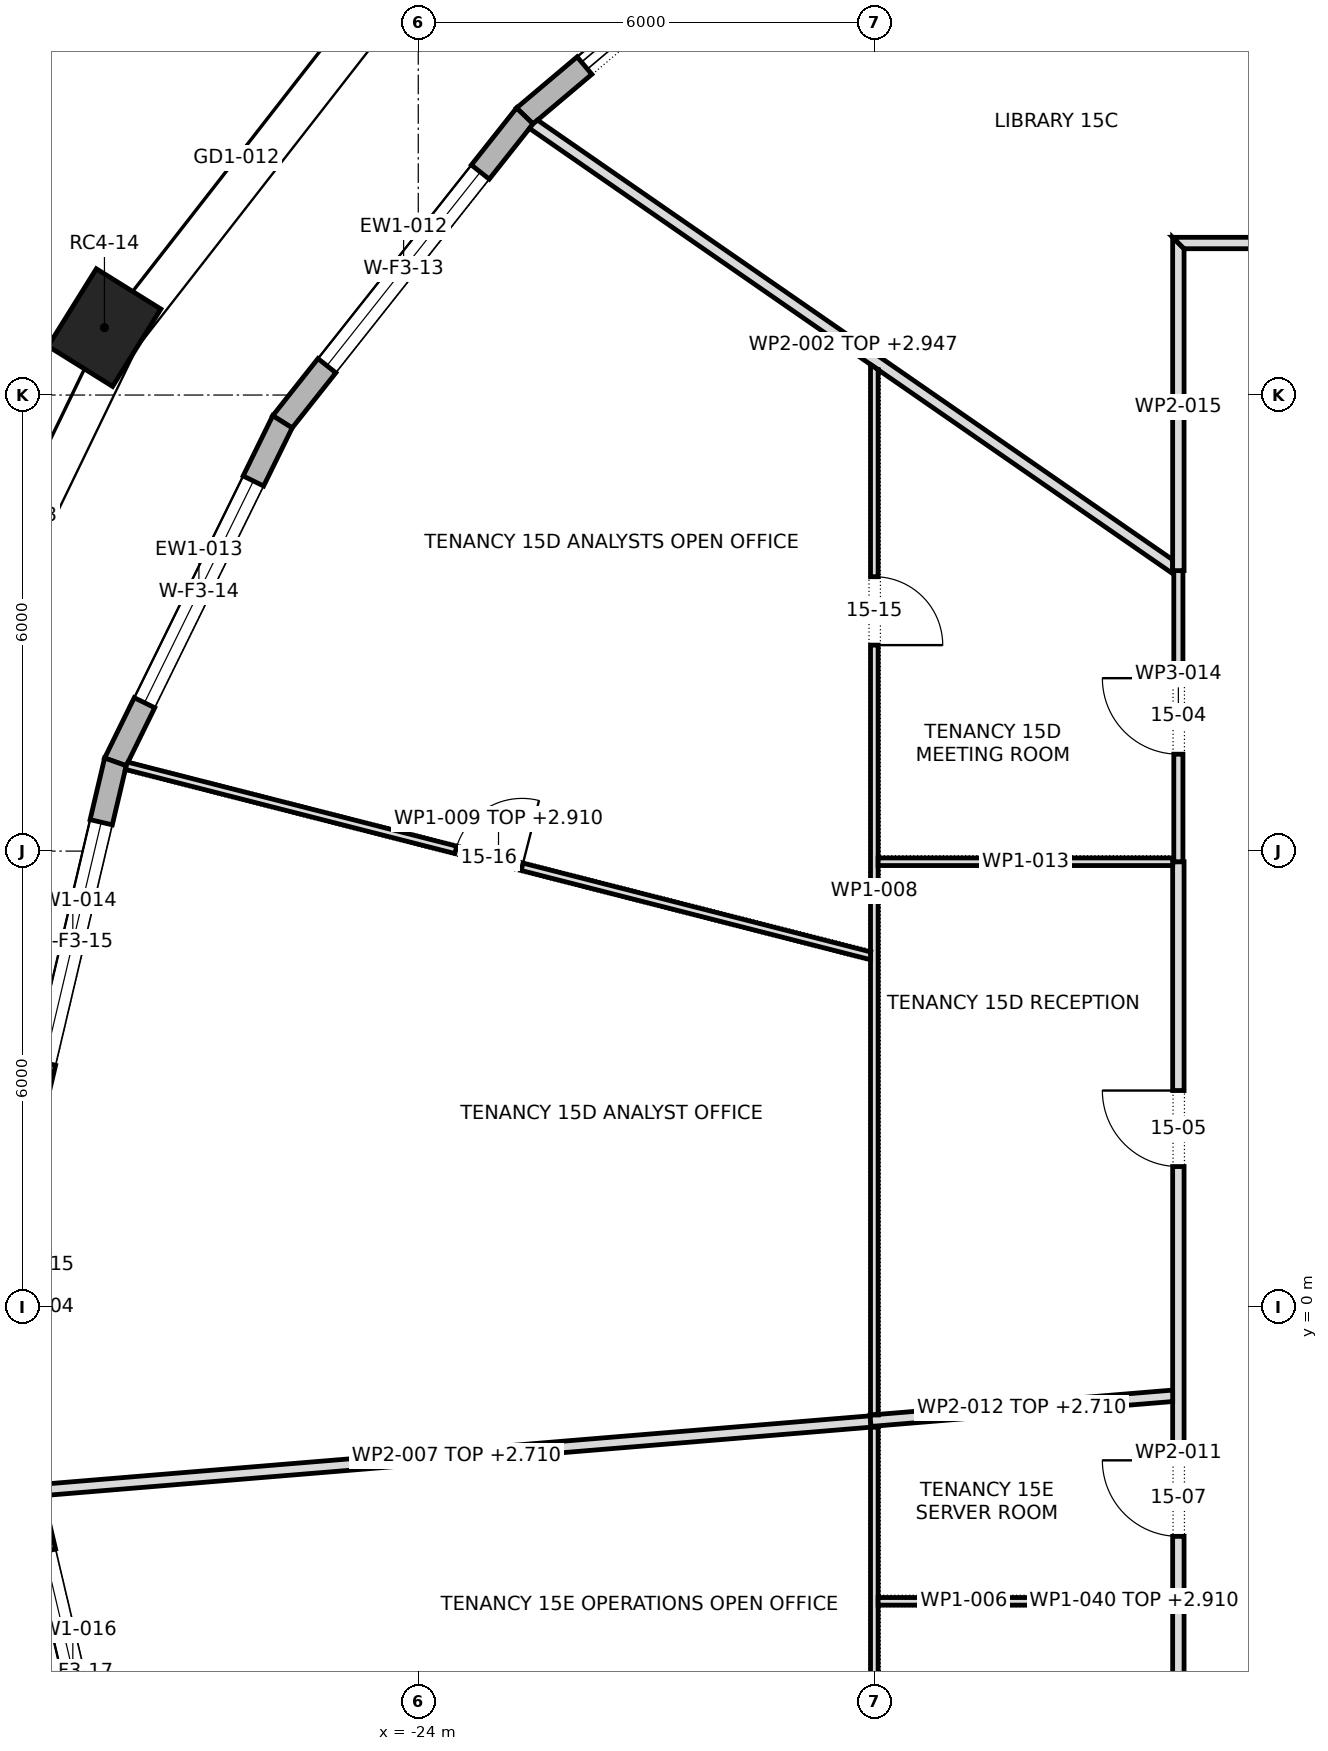
"""IFC4 building model, lengths in metres.
Left out: names, types, materials, properties, quantities, classifications, styles, units other than length and angle.
Written with IfcOpenShell. Run it as: python <this file> out.ifc"""

import sys

from ifc_helpers import new_model, si_unit, direction, frame, frame_2d, origin, origin_2d, place, context, subcontext, project, spatial, polyline, rectangle, outline, extrude, element, fill, save


model = new_model("IFC4")
c1 = context("Model", 3, precision=1e-05, world=origin(), true_north=direction((0.0, 1.0)))
c2 = subcontext(c1, "Body", "Model", "MODEL_VIEW")
j1 = project(units=[si_unit("LENGTHUNIT", "METRE"), si_unit("PLANEANGLEUNIT", "RADIAN")], contexts=[c1])
p1 = place(None, origin())
s1 = spatial("IfcSite", under=j1, at=p1, CompositionType="ELEMENT")
p2 = place(p1, origin())
s2 = spatial("IfcBuilding", under=s1, at=p2, CompositionType="ELEMENT")
p3 = place(p2, frame((0.0, 0.0, 214.9)))
s3 = spatial("IfcBuildingStorey", under=s2, at=p3, CompositionType="ELEMENT", Elevation=214.9)
p4 = place(p3, frame((-28.129, 12.887, 0.0), z_axis=(0.0, 0.0, 1.0), x_axis=(-0.529144939165, -0.848531456904, 0.0)))
e1 = element("IfcColumn", 1, at=p4, inside=s3, PredefinedType="COLUMN", context=c2, shape_type="SweptSolid", body=[
    extrude(rectangle(XDim=1.2, YDim=1.0, at=origin_2d()), origin(), (0.0, 0.0, 1.0), 4.0),
])
p5 = place(p3, frame((-18.543, 19.092, 0.0), z_axis=(0.0, 0.0, 1.0), x_axis=(-0.764397795062, -0.644744919255, 0.0)))
e2 = element("IfcWall", 2, at=p5, inside=s3, PredefinedType="STANDARD", context=c2, shape_type="SweptSolid", body=[
    extrude(outline(polyline([(-0.014, -0.15), (5.32, -0.15), (5.29, 0.15), (0.014, 0.15), (-0.014, -0.15)])), origin(), (0.0, 0.0, 1.0), 3.7),
])
p6 = place(p5, frame((1.028, 0.0, 0.0)))
e3 = element("IfcOpeningElement", 3, at=p6, cuts=e2, PredefinedType="OPENING", context=c2, shape_type="SweptSolid", body=[
    extrude(rectangle(XDim=3.25, YDim=3.25, at=frame_2d((1.625, 1.625))), frame((0.0, 0.162, 0.0), z_axis=(0.0, -1.0, 0.0), x_axis=(1.0, 0.0, 0.0)), (0.0, 0.0, 1.0), 0.324),
])
p7 = place(p3, frame((-22.599, 15.672, 0.0), z_axis=(0.0, 0.0, 1.0), x_axis=(-0.621017151557, -0.783796974651, 0.0)))
e4 = element("IfcWall", 4, at=p7, inside=s3, PredefinedType="STANDARD", context=c2, shape_type="SweptSolid", body=[
    extrude(outline(polyline([(-0.015, -0.15), (5.15, -0.15), (5.118, 0.15), (0.015, 0.15), (-0.015, -0.15)])), origin(), (0.0, 0.0, 1.0), 3.7),
])
p8 = place(p7, frame((0.942, 0.0, 0.6)))
e5 = element("IfcOpeningElement", 5, at=p8, cuts=e4, PredefinedType="OPENING", context=c2, shape_type="SweptSolid", body=[
    extrude(rectangle(XDim=3.25, YDim=2.65, at=frame_2d((1.625, 1.325))), frame((0.0, 0.162, 0.0), z_axis=(0.0, -1.0, 0.0), x_axis=(1.0, 0.0, 0.0)), (0.0, 0.0, 1.0), 0.324),
])
p9 = place(p3, frame((-25.787, 11.648, 0.0), z_axis=(0.0, 0.0, 1.0), x_axis=(-0.440795186599, -0.897607711348, 0.0)))
e6 = element("IfcWall", 6, at=p9, inside=s3, PredefinedType="STANDARD", context=c2, shape_type="SweptSolid", body=[
    extrude(outline(polyline([(-0.016, -0.15), (5.001, -0.15), (4.967, 0.15), (0.016, 0.15), (-0.016, -0.15)])), origin(), (0.0, 0.0, 1.0), 3.7),
])
p10 = place(p9, frame((0.867, 0.0, 0.6)))
e7 = element("IfcOpeningElement", 7, at=p10, cuts=e6, PredefinedType="OPENING", context=c2, shape_type="SweptSolid", body=[
    extrude(rectangle(XDim=3.25, YDim=2.65, at=frame_2d((1.625, 1.325))), frame((0.0, 0.162, 0.0), z_axis=(0.0, -1.0, 0.0), x_axis=(1.0, 0.0, 0.0)), (0.0, 0.0, 1.0), 0.324),
])
p11 = place(p3, frame((-27.984, 7.174, 0.0), z_axis=(0.0, 0.0, 1.0), x_axis=(-0.229546618766, -0.97329766763, 0.0)))
e8 = element("IfcWall", 8, at=p11, inside=s3, PredefinedType="STANDARD", context=c2, shape_type="SweptSolid", body=[
    extrude(outline(polyline([(-0.017, -0.15), (4.899, -0.15), (4.865, 0.15), (0.017, 0.15), (-0.017, -0.15)])), origin(), (0.0, 0.0, 1.0), 3.7),
])
p12 = place(p11, frame((0.816, 0.0, 0.6)))
e9 = element("IfcOpeningElement", 9, at=p12, cuts=e8, PredefinedType="OPENING", context=c2, shape_type="SweptSolid", body=[
    extrude(rectangle(XDim=3.25, YDim=2.65, at=frame_2d((1.625, 1.325))), frame((0.0, 0.162, 0.0), z_axis=(0.0, -1.0, 0.0), x_axis=(1.0, 0.0, 0.0)), (0.0, 0.0, 1.0), 0.324),
])
p13 = place(p3, frame((-29.104, -2.423, 0.0), z_axis=(0.0, 0.0, 1.0), x_axis=(0.229546618766, -0.97329766763, 0.0)))
e10 = element("IfcWall", 10, at=p13, inside=s3, PredefinedType="STANDARD", context=c2, shape_type="SweptSolid", body=[
    extrude(outline(polyline([(-0.017, -0.15), (4.899, -0.15), (4.865, 0.15), (0.017, 0.15), (-0.017, -0.15)])), origin(), (0.0, 0.0, 1.0), 3.7),
])
p14 = place(p13, frame((0.816, 0.0, 0.6)))
e11 = element("IfcOpeningElement", 11, at=p14, cuts=e10, PredefinedType="OPENING", context=c2, shape_type="SweptSolid", body=[
    extrude(rectangle(XDim=3.25, YDim=2.65, at=frame_2d((1.625, 1.325))), frame((0.0, 0.162, 0.0), z_axis=(0.0, -1.0, 0.0), x_axis=(1.0, 0.0, 0.0)), (0.0, 0.0, 1.0), 0.324),
])
p15 = place(p3, frame((-22.494, 15.57, 0.0), z_axis=(0.0, 0.0, 1.0), x_axis=(0.822227997751, -0.569158255421, 0.0)))
e12 = element("IfcWall", 12, at=p15, inside=s3, PredefinedType="PARTITIONING", context=c2, shape_type="SweptSolid", body=[
    extrude(outline(polyline([(0.0, -0.075), (1.858, -0.075), (3.717, -0.075), (5.575, -0.075), (5.577, -0.073), (5.578, -0.075), (7.155, -0.075), (8.732, -0.075), (10.309, -0.075), (10.309, -0.075), (10.281, -0.034), (10.269, -0.043), (10.24, -0.002), (10.24, -0.002), (10.187, 0.075), (8.493, 0.075), (6.8, 0.075), (5.106, 0.075), (3.412, 0.075), (1.719, 0.075), (0.025, 0.075), (0.004, -0.0), (0.0, -0.066), (0.0, -0.075)])), origin(), (0.0, 0.0, 1.0), 2.947),
])
p16 = place(p3, frame((-18.0, -12.421, 0.0), z_axis=(0.0, 0.0, 1.0), x_axis=(0.0, 1.0, 0.0)))
e13 = element("IfcWall", 13, at=p16, inside=s3, PredefinedType="PARTITIONING", context=c2, shape_type="SweptSolid", body=[
    extrude(outline(polyline([(0.087, -0.05), (1.77, -0.05), (3.453, -0.05), (5.136, -0.05), (6.819, -0.05), (8.501, -0.05), (8.501, -0.05), (8.601, -0.05), (8.601, -0.05), (10.842, -0.05), (10.842, 0.046), (10.842, 0.05), (9.191, 0.05), (7.541, 0.05), (5.89, 0.05), (4.24, 0.05), (4.235, 0.048), (4.234, 0.05), (2.823, 0.05), (1.411, 0.05), (0.0, 0.05), (0.0, 0.05), (0.011, 0.034), (0.023, 0.043), (0.087, -0.05)])), origin(), (0.0, 0.0, 1.0), 3.7),
])
p17 = place(p16, frame((5.981, 0.0, 0.0)))
e14 = element("IfcOpeningElement", 14, at=p17, cuts=e13, PredefinedType="OPENING", context=c2, shape_type="SweptSolid", body=[
    extrude(rectangle(XDim=0.9, YDim=2.1, at=frame_2d((0.45, 1.05))), frame((0.0, 0.062, 0.0), z_axis=(0.0, -1.0, 0.0), x_axis=(1.0, 0.0, 0.0)), (0.0, 0.0, 1.0), 0.124),
])
p18 = place(p3, frame((-17.95, -3.87, 0.0), z_axis=(0.0, 0.0, 1.0), x_axis=(1.0, 0.0, 0.0)))
e15 = element("IfcWall", 15, at=p18, inside=s3, PredefinedType="PARTITIONING", context=c2, shape_type="SweptSolid", body=[
    extrude(rectangle(XDim=2.258, YDim=0.1, at=frame_2d((1.129, 0.0))), origin(), (0.0, 0.0, 1.0), 3.7),
])
p19 = place(p3, frame((-18.049, -1.504, 0.0), z_axis=(0.0, 0.0, 1.0), x_axis=(-0.996601116086, -0.082378488796, 0.0)))
e16 = element("IfcWall", 16, at=p19, inside=s3, PredefinedType="PARTITIONING", context=c2, shape_type="SweptSolid", body=[
    extrude(outline(polyline([(10.936, -0.075), (10.936, 0.044), (10.931, 0.075), (9.11, 0.075), (7.29, 0.075), (5.469, 0.075), (3.648, 0.075), (1.828, 0.075), (0.007, 0.075), (0.007, 0.074), (0.002, 0.075), (0.0, 0.075), (0.0, -0.075), (1.823, -0.075), (3.645, -0.075), (5.468, -0.075), (7.291, -0.075), (9.113, -0.075), (10.936, -0.075)])), origin(), (0.0, 0.0, 1.0), 2.71),
])
p20 = place(p3, frame((-18.0, -1.418, 0.0), z_axis=(0.0, 0.0, 1.0), x_axis=(0.0, 1.0, 0.0)))
e17 = element("IfcWall", 17, at=p20, inside=s3, PredefinedType="PARTITIONING", context=c2, shape_type="SweptSolid", body=[
    extrude(outline(polyline([(0.008, -0.05), (1.813, -0.05), (3.618, -0.05), (5.423, -0.05), (7.229, -0.05), (7.229, -0.05), (7.328, -0.05), (7.328, -0.05), (8.934, -0.05), (10.54, -0.05), (12.146, -0.05), (13.751, -0.05), (13.821, 0.05), (13.821, 0.05), (11.889, 0.05), (9.957, 0.05), (8.025, 0.05), (6.093, 0.05), (6.092, 0.048), (6.085, 0.05), (4.564, 0.05), (3.042, 0.05), (1.521, 0.05), (0.0, 0.05), (0.0, 0.045), (0.008, -0.05)])), origin(), (0.0, 0.0, 1.0), 3.7),
])
p21 = place(p20, frame((10.128, 0.0, 0.0)))
e18 = element("IfcOpeningElement", 18, at=p21, cuts=e17, PredefinedType="OPENING", context=c2, shape_type="SweptSolid", body=[
    extrude(rectangle(XDim=0.9, YDim=2.1, at=frame_2d((0.45, 1.05))), frame((0.0, 0.062, 0.0), z_axis=(0.0, -1.0, 0.0), x_axis=(1.0, 0.0, 0.0)), (0.0, 0.0, 1.0), 0.124),
])
p22 = place(p3, frame((-18.038, 4.62, 0.0), z_axis=(0.0, 0.0, 1.0), x_axis=(-0.96889210833, 0.247483499279, 0.0)))
e19 = element("IfcWall", 19, at=p22, inside=s3, PredefinedType="PARTITIONING", context=c2, shape_type="SweptSolid", body=[
    extrude(outline(polyline([(0.025, -0.05), (1.706, -0.05), (3.386, -0.05), (5.067, -0.05), (6.747, -0.05), (8.427, -0.05), (10.108, -0.05), (10.117, -0.005), (10.117, 0.05), (8.431, 0.05), (6.745, 0.05), (5.059, 0.05), (3.373, 0.05), (1.686, 0.05), (0.0, 0.05), (0.0, 0.049), (0.025, -0.05)])), origin(), (0.0, 0.0, 1.0), 2.91),
])
p23 = place(p22, frame((4.744, 0.0, 0.0)))
e20 = element("IfcOpeningElement", 20, at=p23, cuts=e19, PredefinedType="OPENING", context=c2, shape_type="SweptSolid", body=[
    extrude(rectangle(XDim=0.9, YDim=2.1, at=frame_2d((0.45, 1.05))), frame((0.0, 0.062, 0.0), z_axis=(0.0, -1.0, 0.0), x_axis=(1.0, 0.0, 0.0)), (0.0, 0.0, 1.0), 0.124),
])
p24 = place(p3, frame((-14.0, -9.729, 0.0), z_axis=(0.0, 0.0, 1.0), x_axis=(0.0, 1.0, 0.0)))
e21 = element("IfcWall", 21, at=p24, inside=s3, PredefinedType="PARTITIONING", context=c2, shape_type="SweptSolid", body=[
    extrude(outline(polyline([(15.589, 0.075), (13.65, 0.075), (11.712, 0.075), (9.773, 0.075), (7.834, 0.075), (5.895, 0.075), (3.956, 0.075), (2.017, 0.075), (0.079, 0.075), (0.0, -0.075), (0.0, -0.075), (1.949, -0.075), (3.897, -0.075), (5.846, -0.075), (7.795, -0.075), (9.743, -0.075), (11.692, -0.075), (13.641, -0.075), (15.589, -0.075), (15.589, 0.075)])), origin(), (0.0, 0.0, 1.0), 3.7),
])
p25 = place(p24, frame((11.579, 0.0, 0.0)))
e22 = element("IfcOpeningElement", 22, at=p25, cuts=e21, PredefinedType="OPENING", context=c2, shape_type="SweptSolid", body=[
    extrude(rectangle(XDim=1.0, YDim=2.1, at=frame_2d((0.5, 1.05))), frame((0.0, 0.087, 0.0), z_axis=(0.0, -1.0, 0.0), x_axis=(1.0, 0.0, 0.0)), (0.0, 0.0, 1.0), 0.174),
])
p26 = place(p24, frame((2.449, 0.0, 0.0)))
e23 = element("IfcOpeningElement", 23, at=p26, cuts=e21, PredefinedType="OPENING", context=c2, shape_type="SweptSolid", body=[
    extrude(rectangle(XDim=1.0, YDim=2.1, at=frame_2d((0.5, 1.05))), frame((0.0, 0.087, 0.0), z_axis=(0.0, -1.0, 0.0), x_axis=(1.0, 0.0, 0.0)), (0.0, 0.0, 1.0), 0.174),
])
p27 = place(p24, frame((6.714, 0.0, 0.0)))
e24 = element("IfcOpeningElement", 24, at=p27, cuts=e21, PredefinedType="OPENING", context=c2, shape_type="SweptSolid", body=[
    extrude(rectangle(XDim=1.0, YDim=2.1, at=frame_2d((0.5, 1.05))), frame((0.0, 0.087, 0.0), z_axis=(0.0, -1.0, 0.0), x_axis=(1.0, 0.0, 0.0)), (0.0, 0.0, 1.0), 0.174),
])
p28 = place(p3, frame((-14.069, -1.166, 0.0), z_axis=(0.0, 0.0, 1.0), x_axis=(-0.996614549641, -0.082215810186, 0.0)))
e25 = element("IfcWall", 25, at=p28, inside=s3, PredefinedType="PARTITIONING", context=c2, shape_type="SweptSolid", body=[
    extrude(outline(polyline([(0.0, -0.075), (1.944, -0.075), (3.888, -0.075), (3.888, -0.067), (3.982, -0.075), (3.994, -0.075), (3.994, 0.075), (2.003, 0.075), (0.012, 0.075), (0.0, -0.069), (0.0, -0.075)])), origin(), (0.0, 0.0, 1.0), 2.71),
])
p29 = place(p3, frame((-14.061, 5.86, 0.0), z_axis=(0.0, 0.0, 1.0), x_axis=(-1.0, 0.0, 0.0)))
e26 = element("IfcWall", 26, at=p29, inside=s3, PredefinedType="PARTITIONING", context=c2, shape_type="SweptSolid", body=[
    extrude(outline(polyline([(3.889, 0.05), (1.952, 0.05), (0.014, 0.05), (0.014, 0.0), (0.0, 0.0), (0.0, -0.05), (1.945, -0.05), (3.889, -0.05), (3.889, 0.05)])), origin(), (0.0, 0.0, 1.0), 3.7),
])
p30 = place(p3, frame((-14.0, 5.86, 0.0), z_axis=(0.0, 0.0, 1.0), x_axis=(0.0, 1.0, 0.0)))
e27 = element("IfcWall", 27, at=p30, inside=s3, PredefinedType="PARTITIONING", context=c2, shape_type="SweptSolid", body=[
    extrude(rectangle(XDim=3.83, YDim=0.12, at=frame_2d((1.915, 0.0))), origin(), (0.0, 0.0, 1.0), 3.7),
])
p31 = place(p30, frame((1.415, 0.0, 0.0)))
e28 = element("IfcOpeningElement", 28, at=p31, cuts=e27, PredefinedType="OPENING", context=c2, shape_type="SweptSolid", body=[
    extrude(rectangle(XDim=1.0, YDim=2.1, at=frame_2d((0.5, 1.05))), frame((0.0, 0.072, 0.0), z_axis=(0.0, -1.0, 0.0), x_axis=(1.0, 0.0, 0.0)), (0.0, 0.0, 1.0), 0.144),
])
p32 = place(p3, frame((-14.0, 9.69, 0.0), z_axis=(0.0, 0.0, 1.0), x_axis=(0.0, 1.0, 0.0)))
e29 = element("IfcWall", 29, at=p32, inside=s3, PredefinedType="PARTITIONING", context=c2, shape_type="SweptSolid", body=[
    extrude(outline(polyline([(0.0, -0.075), (1.412, -0.075), (2.823, -0.075), (4.235, -0.075), (4.385, 0.075), (2.923, 0.075), (1.462, 0.075), (0.0, 0.075), (0.0, -0.075)])), origin(), (0.0, 0.0, 1.0), 3.7),
])
p33 = place(p3, frame((-14.075, 14.0, 0.0), z_axis=(0.0, 0.0, 1.0), x_axis=(1.0, 0.0, 0.0)))
e30 = element("IfcWall", 30, at=p33, inside=s3, PredefinedType="PARTITIONING", context=c2, shape_type="SweptSolid", body=[
    extrude(outline(polyline([(15.705, 0.075), (13.742, 0.075), (11.779, 0.075), (9.815, 0.075), (7.853, 0.075), (5.889, 0.075), (3.926, 0.075), (1.963, 0.075), (0.0, 0.075), (0.15, -0.075), (2.094, -0.075), (4.039, -0.075), (5.983, -0.075), (7.927, -0.075), (9.872, -0.075), (11.816, -0.075), (13.76, -0.075), (15.705, -0.075), (15.705, 0.075)])), origin(), (0.0, 0.0, 1.0), 3.7),
])
p34 = place(p33, frame((9.955, 0.0, 0.0)))
e31 = element("IfcOpeningElement", 31, at=p34, cuts=e30, PredefinedType="OPENING", context=c2, shape_type="SweptSolid", body=[
    extrude(rectangle(XDim=1.0, YDim=2.1, at=frame_2d((0.5, 1.05))), frame((0.0, 0.087, 0.0), z_axis=(0.0, -1.0, 0.0), x_axis=(1.0, 0.0, 0.0)), (0.0, 0.0, 1.0), 0.174),
])
p35 = place(p33, frame((2.14, 0.0, 0.0)))
e32 = element("IfcOpeningElement", 32, at=p35, cuts=e30, PredefinedType="OPENING", context=c2, shape_type="SweptSolid", body=[
    extrude(rectangle(XDim=1.0, YDim=2.1, at=frame_2d((0.5, 1.05))), frame((0.0, 0.087, 0.0), z_axis=(0.0, -1.0, 0.0), x_axis=(1.0, 0.0, 0.0)), (0.0, 0.0, 1.0), 0.174),
])
p36 = place(p3, frame((-8.892, 14.035, 0.0), z_axis=(0.0, 0.0, 1.0), x_axis=(-0.535558051622, 0.84449841524, 0.0)))
e33 = element("IfcWall", 33, at=p36, inside=s3, PredefinedType="PARTITIONING", context=c2, shape_type="SweptSolid", body=[
    extrude(outline(polyline([(0.0, -0.075), (1.798, -0.075), (3.595, -0.075), (5.393, -0.075), (7.191, -0.075), (8.989, -0.075), (9.006, -0.0), (9.01, 0.069), (9.01, 0.075), (7.227, 0.075), (5.444, 0.075), (3.661, 0.075), (1.878, 0.075), (0.095, 0.075), (0.0, -0.075), (0.0, -0.075)])), origin(), (0.0, 0.0, 1.0), 3.1),
])
p37 = place(p3, frame((-15.692, -3.87, 0.0), z_axis=(0.0, 0.0, 1.0), x_axis=(1.0, 0.0, 0.0)))
e34 = element("IfcWall", 34, at=p37, inside=s3, PredefinedType="PARTITIONING", context=c2, shape_type="SweptSolid", body=[
    extrude(rectangle(XDim=1.617, YDim=0.1, at=frame_2d((0.809, 0.0))), origin(), (0.0, 0.0, 1.0), 2.91),
])
p38 = place(p6, origin())
e35 = element("IfcDoor", 35, at=p38, inside=s3, OperationType="DOUBLE_DOOR_SLIDING", PredefinedType="DOOR", context=c2, shape_type="SweptSolid", body=[
    extrude(rectangle(XDim=3.25, YDim=3.25, at=frame_2d((1.625, 1.625))), frame((0.0, 0.025, 0.0), z_axis=(0.0, -1.0, 0.0), x_axis=(1.0, 0.0, 0.0)), (0.0, 0.0, 1.0), 0.05),
])
fill(e3, e35)
p39 = place(p8, origin())
e36 = element("IfcWindow", 36, at=p39, inside=s3, PartitioningType="TRIPLE_PANEL_VERTICAL", PredefinedType="WINDOW", context=c2, shape_type="SweptSolid", body=[
    extrude(rectangle(XDim=3.25, YDim=2.65, at=frame_2d((1.625, 1.325))), frame((0.0, 0.03, 0.0), z_axis=(0.0, -1.0, 0.0), x_axis=(1.0, 0.0, 0.0)), (0.0, 0.0, 1.0), 0.06),
])
fill(e5, e36)
p40 = place(p10, origin())
e37 = element("IfcWindow", 37, at=p40, inside=s3, PartitioningType="TRIPLE_PANEL_VERTICAL", PredefinedType="WINDOW", context=c2, shape_type="SweptSolid", body=[
    extrude(rectangle(XDim=3.25, YDim=2.65, at=frame_2d((1.625, 1.325))), frame((0.0, 0.03, 0.0), z_axis=(0.0, -1.0, 0.0), x_axis=(1.0, 0.0, 0.0)), (0.0, 0.0, 1.0), 0.06),
])
fill(e7, e37)
p41 = place(p12, origin())
e38 = element("IfcWindow", 38, at=p41, inside=s3, PartitioningType="TRIPLE_PANEL_VERTICAL", PredefinedType="WINDOW", context=c2, shape_type="SweptSolid", body=[
    extrude(rectangle(XDim=3.25, YDim=2.65, at=frame_2d((1.625, 1.325))), frame((0.0, 0.03, 0.0), z_axis=(0.0, -1.0, 0.0), x_axis=(1.0, 0.0, 0.0)), (0.0, 0.0, 1.0), 0.06),
])
fill(e9, e38)
p42 = place(p14, origin())
e39 = element("IfcWindow", 39, at=p42, inside=s3, PartitioningType="TRIPLE_PANEL_VERTICAL", PredefinedType="WINDOW", context=c2, shape_type="SweptSolid", body=[
    extrude(rectangle(XDim=3.25, YDim=2.65, at=frame_2d((1.625, 1.325))), frame((0.0, 0.03, 0.0), z_axis=(0.0, -1.0, 0.0), x_axis=(1.0, 0.0, 0.0)), (0.0, 0.0, 1.0), 0.06),
])
fill(e11, e39)
p43 = place(p31, origin())
e40 = element("IfcDoor", 40, at=p43, inside=s3, OperationType="SINGLE_SWING_LEFT", PredefinedType="DOOR", context=c2, shape_type="SweptSolid", body=[
    extrude(rectangle(XDim=1.0, YDim=2.1, at=frame_2d((0.5, 1.05))), frame((0.0, 0.025, 0.0), z_axis=(0.0, -1.0, 0.0), x_axis=(1.0, 0.0, 0.0)), (0.0, 0.0, 1.0), 0.05),
])
fill(e28, e40)
p44 = place(p25, origin())
e41 = element("IfcDoor", 41, at=p44, inside=s3, OperationType="SINGLE_SWING_LEFT", PredefinedType="DOOR", context=c2, shape_type="SweptSolid", body=[
    extrude(rectangle(XDim=1.0, YDim=2.1, at=frame_2d((0.5, 1.05))), frame((0.0, 0.025, 0.0), z_axis=(0.0, -1.0, 0.0), x_axis=(1.0, 0.0, 0.0)), (0.0, 0.0, 1.0), 0.05),
])
fill(e22, e41)
p45 = place(p27, origin())
e42 = element("IfcDoor", 42, at=p45, inside=s3, OperationType="SINGLE_SWING_LEFT", PredefinedType="DOOR", context=c2, shape_type="SweptSolid", body=[
    extrude(rectangle(XDim=1.0, YDim=2.1, at=frame_2d((0.5, 1.05))), frame((0.0, 0.025, 0.0), z_axis=(0.0, -1.0, 0.0), x_axis=(1.0, 0.0, 0.0)), (0.0, 0.0, 1.0), 0.05),
])
fill(e24, e42)
p46 = place(p21, frame((0.9, 0.0, 0.0), z_axis=(0.0, 0.0, 1.0), x_axis=(-1.0, 0.0, 0.0)))
e43 = element("IfcDoor", 43, at=p46, inside=s3, OperationType="SINGLE_SWING_LEFT", PredefinedType="DOOR", context=c2, shape_type="SweptSolid", body=[
    extrude(rectangle(XDim=0.9, YDim=2.1, at=frame_2d((0.45, 1.05))), frame((0.0, 0.025, 0.0), z_axis=(0.0, -1.0, 0.0), x_axis=(1.0, 0.0, 0.0)), (0.0, 0.0, 1.0), 0.05),
])
fill(e18, e43)
p47 = place(p23, frame((0.9, 0.0, 0.0), z_axis=(0.0, 0.0, 1.0), x_axis=(-1.0, 0.0, 0.0)))
e44 = element("IfcDoor", 44, at=p47, inside=s3, OperationType="SINGLE_SWING_LEFT", PredefinedType="DOOR", context=c2, shape_type="SweptSolid", body=[
    extrude(rectangle(XDim=0.9, YDim=2.1, at=frame_2d((0.45, 1.05))), frame((0.0, 0.025, 0.0), z_axis=(0.0, -1.0, 0.0), x_axis=(1.0, 0.0, 0.0)), (0.0, 0.0, 1.0), 0.05),
])
fill(e20, e44)
save(model, sys.argv[1])
